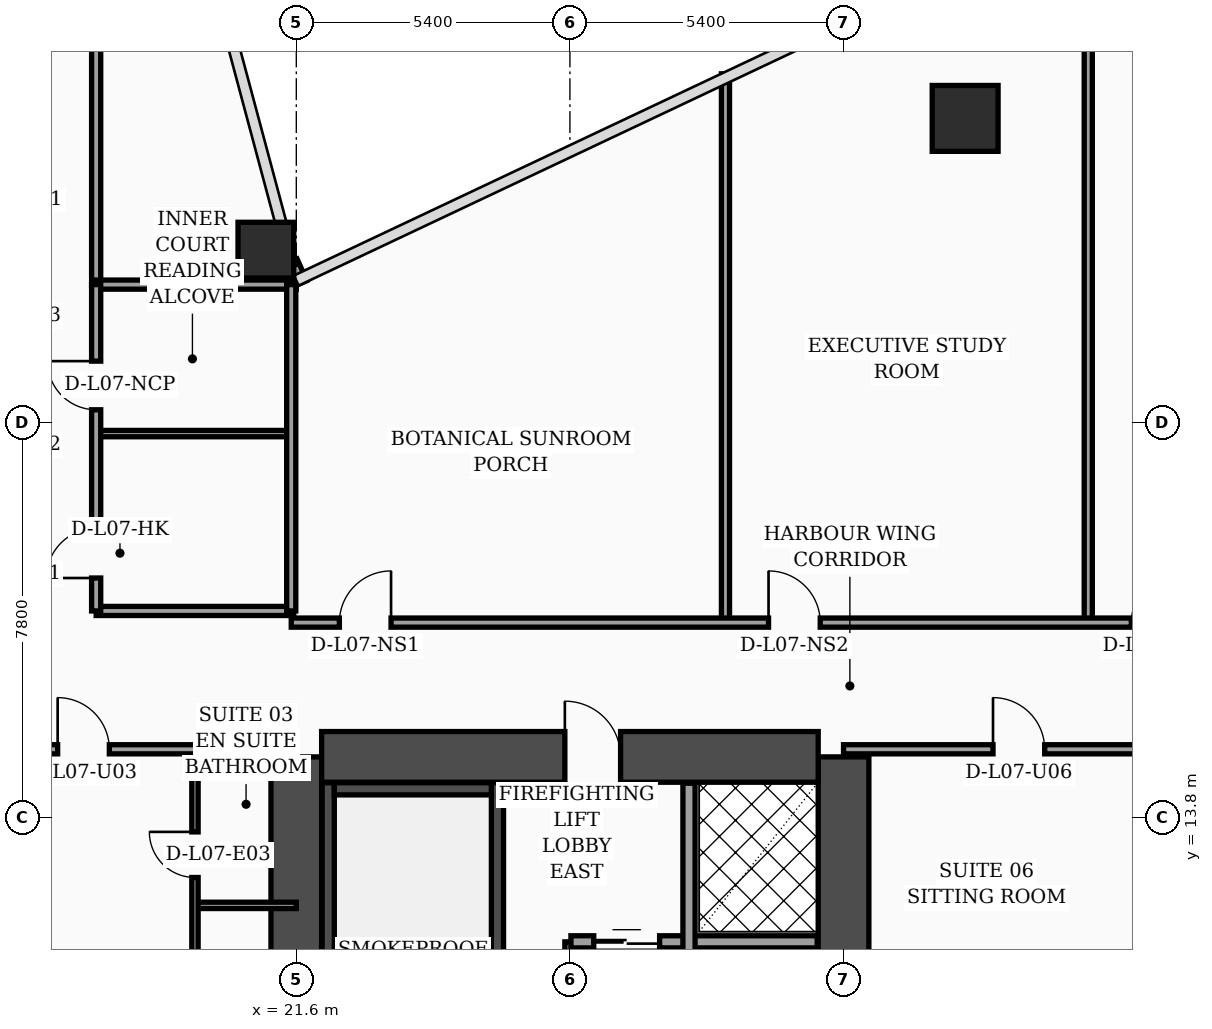
"""IFC4 building model, lengths in metres.
Left out: names, types, materials, properties, quantities, classifications, styles, units other than length and angle.
Written with IfcOpenShell. Run it as: python <this file> out.ifc"""

import sys

from ifc_helpers import new_model, si_unit, direction, frame, frame_2d, origin, origin_2d, place, context, subcontext, project, spatial, rectangle, hollow_rectangle, circle, extrude, element, fill, save


model = new_model("IFC4")
c1 = context("Model", 3, precision=1e-05, world=origin(), true_north=direction((0.0, 1.0)))
c2 = subcontext(c1, "Body", "Model", "MODEL_VIEW")
j1 = project(units=[si_unit("LENGTHUNIT", "METRE"), si_unit("PLANEANGLEUNIT", "RADIAN")], contexts=[c1])
p1 = place(None, origin())
s1 = spatial("IfcSite", under=j1, at=p1, CompositionType="ELEMENT")
p2 = place(p1, origin())
s2 = spatial("IfcBuilding", under=s1, at=p2, CompositionType="ELEMENT")
p3 = place(p2, frame((0.0, 0.0, 34.6)))
s3 = spatial("IfcBuildingStorey", under=s2, at=p3, CompositionType="ELEMENT", Elevation=34.6)
for number, where, z_axis, x_axis in (
    (1, (21.6, 4.6, 0.0), (0.0, 0.0, 1.0), (0.0, 1.0, 0.0)),
    (2, (32.4, 4.6, 0.0), (0.0, 0.0, 1.0), (0.0, 1.0, 0.0)),
):
    element("IfcWall", number, at=place(p3, frame(where, z_axis=z_axis, x_axis=x_axis)), inside=s3, PredefinedType="SHEAR", context=c2, shape_type="SweptSolid", body=[
        extrude(rectangle(XDim=10.4, YDim=1.0, at=frame_2d((5.2, 0.0))), origin(), (0.0, 0.0, 1.0), 3.56),
    ])
p4 = place(p3, frame((22.1, 15.0, 0.0), z_axis=(0.0, 0.0, 1.0), x_axis=(1.0, 0.0, 0.0)))
e3 = element("IfcWall", 3, at=p4, inside=s3, PredefinedType="SHEAR", context=c2, shape_type="SweptSolid", body=[
    extrude(rectangle(XDim=9.8, YDim=1.0, at=frame_2d((4.9, 0.0))), origin(), (0.0, 0.0, 1.0), 3.56),
])
p5 = place(p4, frame((4.8, 0.0, 0.0)))
e4 = element("IfcOpeningElement", 4, at=p5, cuts=e3, PredefinedType="OPENING", context=c2, shape_type="SweptSolid", body=[
    extrude(rectangle(XDim=1.1, YDim=2.2, at=frame_2d((0.55, 1.1))), frame((0.0, 0.51, 0.0), z_axis=(0.0, -1.0, 0.0), x_axis=(1.0, 0.0, 0.0)), (0.0, 0.0, 1.0), 1.02),
])
p6 = place(p3, frame((22.23, 5.1, 0.0), z_axis=(0.0, 0.0, 1.0), x_axis=(0.0, 1.0, 0.0)))
e5 = element("IfcWall", 5, at=p6, inside=s3, PredefinedType="SOLIDWALL", context=c2, shape_type="SweptSolid", body=[
    extrude(rectangle(XDim=9.39, YDim=0.24, at=frame_2d((4.695, 0.0))), origin(), (0.0, 0.0, 1.0), 3.56),
])
p7 = place(p3, frame((25.57, 5.1, 0.0), z_axis=(0.0, 0.0, 1.0), x_axis=(0.0, 1.0, 0.0)))
e6 = element("IfcWall", 6, at=p7, inside=s3, PredefinedType="SOLIDWALL", context=c2, shape_type="SweptSolid", body=[
    extrude(rectangle(XDim=9.39, YDim=0.24, at=frame_2d((4.695, 0.0))), origin(), (0.0, 0.0, 1.0), 3.56),
])
p8 = place(p7, frame((0.35, 0.0, 0.0)))
e7 = element("IfcOpeningElement", 7, at=p8, cuts=e6, PredefinedType="OPENING", context=c2, shape_type="SweptSolid", body=[
    extrude(rectangle(XDim=1.15, YDim=2.2, at=frame_2d((0.575, 1.1))), frame((0.0, 0.13, 0.0), z_axis=(0.0, -1.0, 0.0), x_axis=(1.0, 0.0, 0.0)), (0.0, 0.0, 1.0), 0.26),
])
p9 = place(p3, frame((22.35, 14.37, 0.0), z_axis=(0.0, 0.0, 1.0), x_axis=(1.0, 0.0, 0.0)))
e8 = element("IfcWall", 8, at=p9, inside=s3, PredefinedType="SOLIDWALL", context=c2, shape_type="SweptSolid", body=[
    extrude(rectangle(XDim=3.1, YDim=0.24, at=frame_2d((1.55, 0.0))), origin(), (0.0, 0.0, 1.0), 3.56),
])
p10 = place(p3, frame((21.0, 25.0, 0.0), z_axis=(0.0, 0.0, 1.0), x_axis=(1.0, 0.0, 0.0)))
e9 = element("IfcColumn", 9, at=p10, inside=s3, PredefinedType="COLUMN", context=c2, shape_type="SweptSolid", body=[
    extrude(hollow_rectangle(XDim=1.1, YDim=1.1, WallThickness=0.045, at=origin_2d()), origin(), (0.0, 0.0, 1.0), 3.56),
])
p11 = place(p3, frame((34.8, 27.6, 0.0), z_axis=(0.0, 0.0, 1.0), x_axis=(1.0, 0.0, 0.0)))
e10 = element("IfcColumn", 10, at=p11, inside=s3, PredefinedType="COLUMN", context=c2, shape_type="SweptSolid", body=[
    extrude(circle(Radius=0.65, at=origin_2d()), origin(), (0.0, 0.0, 1.0), 3.56),
])
p12 = place(p3, frame((21.68, 24.34, 0.0), z_axis=(0.0, 0.0, 1.0), x_axis=(-0.40758134973, 0.913168901875, 0.0)))
e11 = element("IfcWall", 11, at=p12, inside=s3, PredefinedType="SOLIDWALL", context=c2, shape_type="SweptSolid", body=[
    extrude(rectangle(XDim=0.471, YDim=0.28, at=frame_2d((0.235, 0.0))), origin(), (0.0, 0.0, 1.0), 3.56),
])
p13 = place(p3, frame((27.02, 5.12, 0.0), z_axis=(0.0, 0.0, 1.0), x_axis=(0.0, 1.0, 0.0)))
e12 = element("IfcWall", 12, at=p13, inside=s3, PredefinedType="SOLIDWALL", context=c2, shape_type="SweptSolid", body=[
    extrude(rectangle(XDim=6.23, YDim=0.24, at=frame_2d((3.115, 0.0))), origin(), (0.0, 0.0, 1.0), 3.56),
])
p14 = place(p3, frame((27.02, 11.35, 0.0), z_axis=(0.0, 0.0, 1.0), x_axis=(1.0, 0.0, 0.0)))
e13 = element("IfcWall", 13, at=p14, inside=s3, PredefinedType="SOLIDWALL", context=c2, shape_type="SweptSolid", body=[
    extrude(rectangle(XDim=4.86, YDim=0.24, at=frame_2d((2.43, 0.0))), origin(), (0.0, 0.0, 1.0), 3.56),
])
p15 = place(p14, frame((0.45, 0.0, 0.0)))
e14 = element("IfcOpeningElement", 14, at=p15, cuts=e13, PredefinedType="OPENING", context=c2, shape_type="SweptSolid", body=[
    extrude(rectangle(XDim=1.3, YDim=2.35, at=frame_2d((0.65, 1.175))), frame((0.0, 0.13, 0.0), z_axis=(0.0, -1.0, 0.0), x_axis=(1.0, 0.0, 0.0)), (0.0, 0.0, 1.0), 0.26),
])
p16 = place(p3, frame((29.35, 5.12, 0.0), z_axis=(0.0, 0.0, 1.0), x_axis=(0.0, 1.0, 0.0)))
e15 = element("IfcWall", 15, at=p16, inside=s3, PredefinedType="SOLIDWALL", context=c2, shape_type="SweptSolid", body=[
    extrude(rectangle(XDim=9.36, YDim=0.24, at=frame_2d((4.68, 0.0))), origin(), (0.0, 0.0, 1.0), 3.56),
])
p17 = place(p16, frame((0.55, 0.0, 0.0)))
e16 = element("IfcOpeningElement", 16, at=p17, cuts=e15, PredefinedType="OPENING", context=c2, shape_type="SweptSolid", body=[
    extrude(rectangle(XDim=1.3, YDim=2.35, at=frame_2d((0.65, 1.175))), frame((0.0, 0.13, 0.0), z_axis=(0.0, -1.0, 0.0), x_axis=(1.0, 0.0, 0.0)), (0.0, 0.0, 1.0), 0.26),
])
p18 = place(p3, frame((19.6, 12.07, 0.0), z_axis=(0.0, 0.0, 1.0), x_axis=(1.0, 0.0, 0.0)))
e17 = element("IfcWall", 17, at=p18, inside=s3, PredefinedType="PARTITIONING", context=c2, shape_type="SweptSolid", body=[
    extrude(rectangle(XDim=2.0, YDim=0.125, at=frame_2d((1.0, 0.0))), origin(), (0.0, 0.0, 1.0), 3.56),
])
p19 = place(p3, frame((19.6, 2.44, 0.0), z_axis=(0.0, 0.0, 1.0), x_axis=(0.0, 1.0, 0.0)))
e18 = element("IfcWall", 18, at=p19, inside=s3, PredefinedType="PARTITIONING", context=c2, shape_type="SweptSolid", body=[
    extrude(rectangle(XDim=12.71, YDim=0.125, at=frame_2d((6.355, 0.0))), origin(), (0.0, 0.0, 1.0), 2.34),
])
p20 = place(p19, frame((4.34, 0.0, 0.0)))
e19 = element("IfcOpeningElement", 19, at=p20, cuts=e18, PredefinedType="OPENING", context=c2, shape_type="SweptSolid", body=[
    extrude(rectangle(XDim=0.96, YDim=2.2, at=frame_2d((0.48, 1.1))), frame((0.0, 0.073, 0.0), z_axis=(0.0, -1.0, 0.0), x_axis=(1.0, 0.0, 0.0)), (0.0, 0.0, 1.0), 0.145),
])
p21 = place(p19, frame((10.18, 0.0, 0.0)))
e20 = element("IfcOpeningElement", 20, at=p21, cuts=e18, PredefinedType="OPENING", context=c2, shape_type="SweptSolid", body=[
    extrude(rectangle(XDim=0.9, YDim=2.15, at=frame_2d((0.45, 1.075))), frame((0.0, 0.073, 0.0), z_axis=(0.0, -1.0, 0.0), x_axis=(1.0, 0.0, 0.0)), (0.0, 0.0, 1.0), 0.145),
])
p22 = place(p3, frame((15.15, 15.15, 0.0), z_axis=(0.0, 0.0, 1.0), x_axis=(1.0, 0.0, 0.0)))
e21 = element("IfcWall", 21, at=p22, inside=s3, PredefinedType="PARTITIONING", context=c2, shape_type="SweptSolid", body=[
    extrude(rectangle(XDim=6.45, YDim=0.18, at=frame_2d((3.225, 0.0))), origin(), (0.0, 0.0, 1.0), 2.34),
])
p23 = place(p22, frame((1.74, 0.0, 0.0)))
e22 = element("IfcOpeningElement", 22, at=p23, cuts=e21, PredefinedType="OPENING", context=c2, shape_type="SweptSolid", body=[
    extrude(rectangle(XDim=1.02, YDim=2.2, at=frame_2d((0.51, 1.1))), frame((0.0, 0.1, 0.0), z_axis=(0.0, -1.0, 0.0), x_axis=(1.0, 0.0, 0.0)), (0.0, 0.0, 1.0), 0.2),
])
p24 = place(p3, frame((17.65, 24.3, 0.0), z_axis=(0.0, 0.0, 1.0), x_axis=(0.0, 1.0, 0.0)))
e23 = element("IfcWall", 23, at=p24, inside=s3, PredefinedType="PARTITIONING", context=c2, shape_type="SweptSolid", body=[
    extrude(rectangle(XDim=16.4, YDim=0.18, at=frame_2d((8.2, 0.0))), origin(), (0.0, 0.0, 1.0), 2.84),
])
p25 = place(p3, frame((17.65, 17.88, 0.0), z_axis=(0.0, 0.0, 1.0), x_axis=(1.0, 0.0, 0.0)))
e24 = element("IfcWall", 24, at=p25, inside=s3, PredefinedType="PARTITIONING", context=c2, shape_type="SweptSolid", body=[
    extrude(rectangle(XDim=3.9, YDim=0.18, at=frame_2d((1.95, 0.0))), origin(), (0.0, 0.0, 1.0), 3.09),
])
p26 = place(p3, frame((17.65, 21.38, 0.0), z_axis=(0.0, 0.0, 1.0), x_axis=(1.0, 0.0, 0.0)))
e25 = element("IfcWall", 25, at=p26, inside=s3, PredefinedType="PARTITIONING", context=c2, shape_type="SweptSolid", body=[
    extrude(rectangle(XDim=3.9, YDim=0.125, at=frame_2d((1.95, 0.0))), origin(), (0.0, 0.0, 1.0), 3.56),
])
p27 = place(p3, frame((17.65, 24.32, 0.0), z_axis=(0.0, 0.0, 1.0), x_axis=(1.0, 0.0, 0.0)))
e26 = element("IfcWall", 26, at=p27, inside=s3, PredefinedType="PARTITIONING", context=c2, shape_type="SweptSolid", body=[
    extrude(rectangle(XDim=3.95, YDim=0.18, at=frame_2d((1.975, 0.0))), origin(), (0.0, 0.0, 1.0), 3.56),
])
p28 = place(p3, frame((21.5, 17.88, 0.0), z_axis=(0.0, 0.0, 1.0), x_axis=(0.0, 1.0, 0.0)))
e27 = element("IfcWall", 27, at=p28, inside=s3, PredefinedType="PARTITIONING", context=c2, shape_type="SweptSolid", body=[
    extrude(rectangle(XDim=6.44, YDim=0.18, at=frame_2d((3.22, 0.0))), origin(), (0.0, 0.0, 1.0), 3.09),
])
p29 = place(p3, frame((17.65, 17.88, 0.0), z_axis=(0.0, 0.0, 1.0), x_axis=(0.0, 1.0, 0.0)))
e28 = element("IfcWall", 28, at=p29, inside=s3, PredefinedType="PARTITIONING", context=c2, shape_type="SweptSolid", body=[
    extrude(rectangle(XDim=6.44, YDim=0.18, at=frame_2d((3.22, 0.0))), origin(), (0.0, 0.0, 1.0), 3.09),
])
p30 = place(p29, frame((0.65, 0.0, 0.0)))
e29 = element("IfcOpeningElement", 29, at=p30, cuts=e28, PredefinedType="OPENING", context=c2, shape_type="SweptSolid", body=[
    extrude(rectangle(XDim=0.98, YDim=2.15, at=frame_2d((0.49, 1.075))), frame((0.0, 0.1, 0.0), z_axis=(0.0, -1.0, 0.0), x_axis=(1.0, 0.0, 0.0)), (0.0, 0.0, 1.0), 0.2),
])
p31 = place(p29, frame((3.97, 0.0, 0.0)))
e30 = element("IfcOpeningElement", 30, at=p31, cuts=e28, PredefinedType="OPENING", context=c2, shape_type="SweptSolid", body=[
    extrude(rectangle(XDim=0.96, YDim=2.2, at=frame_2d((0.48, 1.1))), frame((0.0, 0.1, 0.0), z_axis=(0.0, -1.0, 0.0), x_axis=(1.0, 0.0, 0.0)), (0.0, 0.0, 1.0), 0.2),
])
p32 = place(p3, frame((32.4, 15.15, 0.0), z_axis=(0.0, 0.0, 1.0), x_axis=(1.0, 0.0, 0.0)))
e31 = element("IfcWall", 31, at=p32, inside=s3, PredefinedType="PARTITIONING", context=c2, shape_type="SweptSolid", body=[
    extrude(rectangle(XDim=15.0, YDim=0.18, at=frame_2d((7.5, 0.0))), origin(), (0.0, 0.0, 1.0), 2.84),
])
p33 = place(p32, frame((2.95, 0.0, 0.0)))
e32 = element("IfcOpeningElement", 32, at=p33, cuts=e31, PredefinedType="OPENING", context=c2, shape_type="SweptSolid", body=[
    extrude(rectangle(XDim=1.02, YDim=2.2, at=frame_2d((0.51, 1.1))), frame((0.0, 0.1, 0.0), z_axis=(0.0, -1.0, 0.0), x_axis=(1.0, 0.0, 0.0)), (0.0, 0.0, 1.0), 0.2),
])
p34 = place(p32, frame((10.45, 0.0, 0.0)))
e33 = element("IfcOpeningElement", 33, at=p34, cuts=e31, PredefinedType="OPENING", context=c2, shape_type="SweptSolid", body=[
    extrude(rectangle(XDim=1.02, YDim=2.2, at=frame_2d((0.51, 1.1))), frame((0.0, 0.1, 0.0), z_axis=(0.0, -1.0, 0.0), x_axis=(1.0, 0.0, 0.0)), (0.0, 0.0, 1.0), 0.2),
])
p35 = place(p3, frame((30.07, 17.65, 0.0), z_axis=(0.0, 0.0, 1.0), x_axis=(0.0, 1.0, 0.0)))
e34 = element("IfcWall", 34, at=p35, inside=s3, PredefinedType="PARTITIONING", context=c2, shape_type="SweptSolid", body=[
    extrude(rectangle(XDim=10.83, YDim=0.16, at=frame_2d((5.415, 0.0))), origin(), (0.0, 0.0, 1.0), 2.84),
])
p36 = place(p3, frame((37.23, 17.65, 0.0), z_axis=(0.0, 0.0, 1.0), x_axis=(0.0, 1.0, 0.0)))
e35 = element("IfcWall", 35, at=p36, inside=s3, PredefinedType="PARTITIONING", context=c2, shape_type="SweptSolid", body=[
    extrude(rectangle(XDim=14.21, YDim=0.16, at=frame_2d((7.105, 0.0))), origin(), (0.0, 0.0, 1.0), 2.84),
])
p37 = place(p3, frame((21.5, 17.65, 0.0), z_axis=(0.0, 0.0, 1.0), x_axis=(1.0, 0.0, 0.0)))
e36 = element("IfcWall", 36, at=p37, inside=s3, PredefinedType="PARTITIONING", context=c2, shape_type="SweptSolid", body=[
    extrude(rectangle(XDim=23.55, YDim=0.18, at=frame_2d((11.775, 0.0))), origin(), (0.0, 0.0, 1.0), 2.84),
])
p38 = place(p37, frame((0.95, 0.0, 0.0)))
e37 = element("IfcOpeningElement", 37, at=p38, cuts=e36, PredefinedType="OPENING", context=c2, shape_type="SweptSolid", body=[
    extrude(rectangle(XDim=1.02, YDim=2.2, at=frame_2d((0.51, 1.1))), frame((0.0, 0.1, 0.0), z_axis=(0.0, -1.0, 0.0), x_axis=(1.0, 0.0, 0.0)), (0.0, 0.0, 1.0), 0.2),
])
p39 = place(p37, frame((9.42, 0.0, 0.0)))
e38 = element("IfcOpeningElement", 38, at=p39, cuts=e36, PredefinedType="OPENING", context=c2, shape_type="SweptSolid", body=[
    extrude(rectangle(XDim=1.02, YDim=2.2, at=frame_2d((0.51, 1.1))), frame((0.0, 0.1, 0.0), z_axis=(0.0, -1.0, 0.0), x_axis=(1.0, 0.0, 0.0)), (0.0, 0.0, 1.0), 0.2),
])
p40 = place(p37, frame((16.58, 0.0, 0.0)))
e39 = element("IfcOpeningElement", 39, at=p40, cuts=e36, PredefinedType="OPENING", context=c2, shape_type="SweptSolid", body=[
    extrude(rectangle(XDim=1.02, YDim=2.2, at=frame_2d((0.51, 1.1))), frame((0.0, 0.1, 0.0), z_axis=(0.0, -1.0, 0.0), x_axis=(1.0, 0.0, 0.0)), (0.0, 0.0, 1.0), 0.2),
])
p41 = place(p15, origin())
e40 = element("IfcDoor", 40, at=p41, inside=s3, OperationType="DOUBLE_DOOR_SLIDING", PredefinedType="DOOR", context=c2, shape_type="SweptSolid", body=[
    extrude(rectangle(XDim=1.3, YDim=2.35, at=frame_2d((0.65, 1.175))), frame((0.0, 0.025, 0.0), z_axis=(0.0, -1.0, 0.0), x_axis=(1.0, 0.0, 0.0)), (0.0, 0.0, 1.0), 0.05),
])
fill(e14, e40)
p42 = place(p21, origin())
e41 = element("IfcDoor", 41, at=p42, inside=s3, OperationType="SINGLE_SWING_RIGHT", PredefinedType="DOOR", context=c2, shape_type="SweptSolid", body=[
    extrude(rectangle(XDim=0.9, YDim=2.15, at=frame_2d((0.45, 1.075))), frame((0.0, 0.025, 0.0), z_axis=(0.0, -1.0, 0.0), x_axis=(1.0, 0.0, 0.0)), (0.0, 0.0, 1.0), 0.05),
])
fill(e20, e41)
p43 = place(p23, origin())
e42 = element("IfcDoor", 42, at=p43, inside=s3, OperationType="SINGLE_SWING_LEFT", PredefinedType="DOOR", context=c2, shape_type="SweptSolid", body=[
    extrude(rectangle(XDim=1.02, YDim=2.2, at=frame_2d((0.51, 1.1))), frame((0.0, 0.025, 0.0), z_axis=(0.0, -1.0, 0.0), x_axis=(1.0, 0.0, 0.0)), (0.0, 0.0, 1.0), 0.05),
])
fill(e22, e42)
p44 = place(p30, origin())
e43 = element("IfcDoor", 43, at=p44, inside=s3, OperationType="SINGLE_SWING_LEFT", PredefinedType="DOOR", context=c2, shape_type="SweptSolid", body=[
    extrude(rectangle(XDim=0.98, YDim=2.15, at=frame_2d((0.49, 1.075))), frame((0.0, 0.025, 0.0), z_axis=(0.0, -1.0, 0.0), x_axis=(1.0, 0.0, 0.0)), (0.0, 0.0, 1.0), 0.05),
])
fill(e29, e43)
p45 = place(p31, origin())
e44 = element("IfcDoor", 44, at=p45, inside=s3, OperationType="SINGLE_SWING_RIGHT", PredefinedType="DOOR", context=c2, shape_type="SweptSolid", body=[
    extrude(rectangle(XDim=0.96, YDim=2.2, at=frame_2d((0.48, 1.1))), frame((0.0, 0.025, 0.0), z_axis=(0.0, -1.0, 0.0), x_axis=(1.0, 0.0, 0.0)), (0.0, 0.0, 1.0), 0.05),
])
fill(e30, e44)
p46 = place(p33, origin())
e45 = element("IfcDoor", 45, at=p46, inside=s3, OperationType="SINGLE_SWING_LEFT", PredefinedType="DOOR", context=c2, shape_type="SweptSolid", body=[
    extrude(rectangle(XDim=1.02, YDim=2.2, at=frame_2d((0.51, 1.1))), frame((0.0, 0.025, 0.0), z_axis=(0.0, -1.0, 0.0), x_axis=(1.0, 0.0, 0.0)), (0.0, 0.0, 1.0), 0.05),
])
fill(e32, e45)
p47 = place(p38, origin())
e46 = element("IfcDoor", 46, at=p47, inside=s3, OperationType="SINGLE_SWING_RIGHT", PredefinedType="DOOR", context=c2, shape_type="SweptSolid", body=[
    extrude(rectangle(XDim=1.02, YDim=2.2, at=frame_2d((0.51, 1.1))), frame((0.0, 0.025, 0.0), z_axis=(0.0, -1.0, 0.0), x_axis=(1.0, 0.0, 0.0)), (0.0, 0.0, 1.0), 0.05),
])
fill(e37, e46)
p48 = place(p39, origin())
e47 = element("IfcDoor", 47, at=p48, inside=s3, OperationType="SINGLE_SWING_LEFT", PredefinedType="DOOR", context=c2, shape_type="SweptSolid", body=[
    extrude(rectangle(XDim=1.02, YDim=2.2, at=frame_2d((0.51, 1.1))), frame((0.0, 0.025, 0.0), z_axis=(0.0, -1.0, 0.0), x_axis=(1.0, 0.0, 0.0)), (0.0, 0.0, 1.0), 0.05),
])
fill(e38, e47)
p49 = place(p40, origin())
e48 = element("IfcDoor", 48, at=p49, inside=s3, OperationType="SINGLE_SWING_RIGHT", PredefinedType="DOOR", context=c2, shape_type="SweptSolid", body=[
    extrude(rectangle(XDim=1.02, YDim=2.2, at=frame_2d((0.51, 1.1))), frame((0.0, 0.025, 0.0), z_axis=(0.0, -1.0, 0.0), x_axis=(1.0, 0.0, 0.0)), (0.0, 0.0, 1.0), 0.05),
])
fill(e39, e48)
p50 = place(p5, origin())
e49 = element("IfcDoor", 49, at=p50, inside=s3, OperationType="SINGLE_SWING_LEFT", PredefinedType="DOOR", context=c2, shape_type="SweptSolid", body=[
    extrude(rectangle(XDim=1.1, YDim=2.2, at=frame_2d((0.55, 1.1))), frame((0.0, 0.025, 0.0), z_axis=(0.0, -1.0, 0.0), x_axis=(1.0, 0.0, 0.0)), (0.0, 0.0, 1.0), 0.05),
])
fill(e4, e49)
save(model, sys.argv[1])
